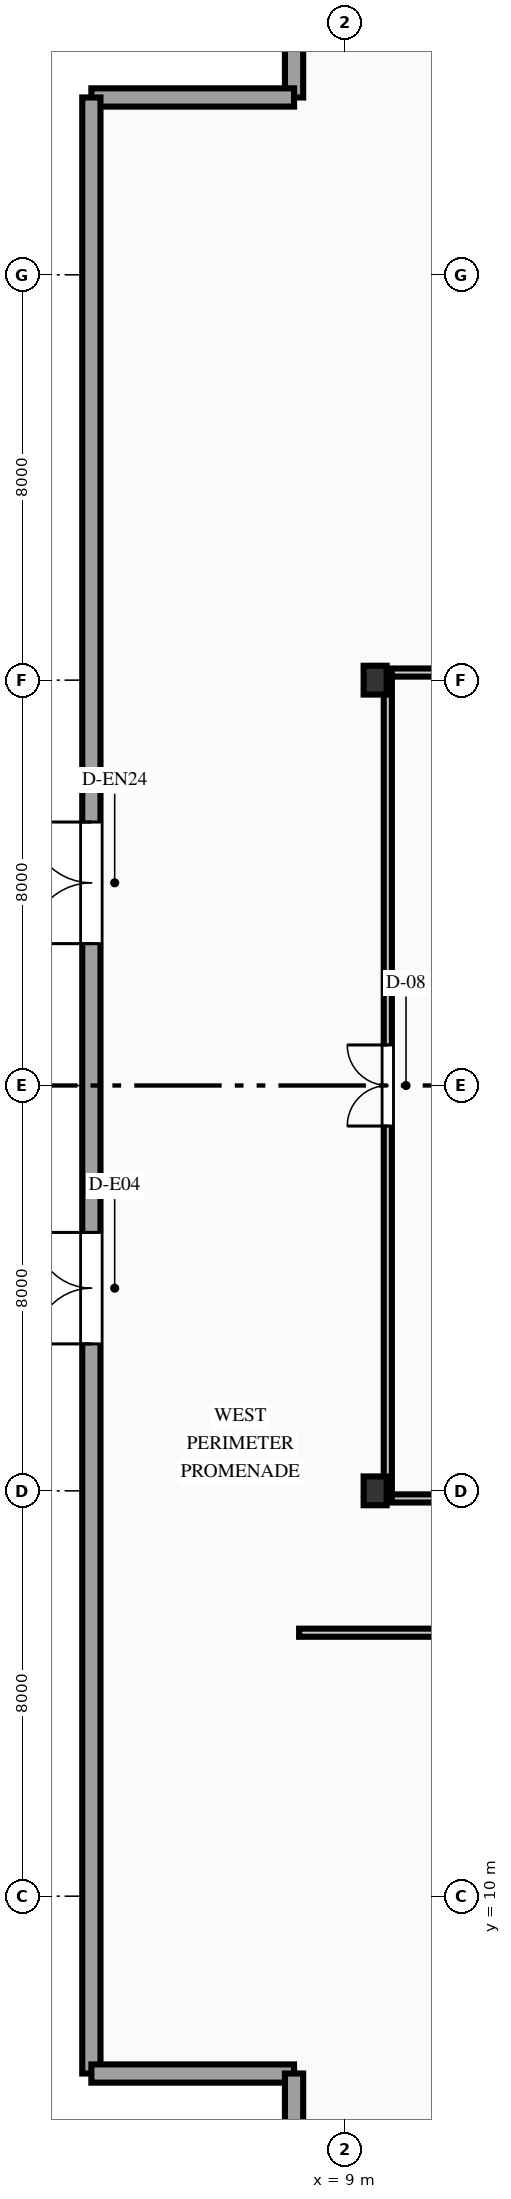
"""IFC4 building model, lengths in metres.
Left out: names, types, materials, properties, quantities, classifications, styles, units other than length and angle.
Written with IfcOpenShell. Run it as: python <this file> out.ifc"""

import sys

from ifc_helpers import new_model, si_unit, direction, frame, frame_2d, origin, origin_2d, place, context, subcontext, project, spatial, rectangle, i_section, extrude, element, fill, save


model = new_model("IFC4")
c1 = context("Model", 3, precision=1e-05, world=origin(), true_north=direction((0.0, 1.0)))
c2 = subcontext(c1, "Body", "Model", "MODEL_VIEW")
j1 = project(units=[si_unit("LENGTHUNIT", "METRE"), si_unit("PLANEANGLEUNIT", "RADIAN")], contexts=[c1])
p1 = place(None, origin())
s1 = spatial("IfcSite", under=j1, at=p1, CompositionType="ELEMENT")
p2 = place(p1, origin())
s2 = spatial("IfcBuilding", under=s1, at=p2, CompositionType="ELEMENT")
p3 = place(p2, origin())
s3 = spatial("IfcBuildingStorey", under=s2, at=p3, CompositionType="ELEMENT", Elevation=0.0)
for number, where, z_axis, x_axis in (
    (1, (9.6, 18.0, 0.0), (0.0, 0.0, 1.0), (1.0, 0.0, 0.0)),
    (2, (9.6, 34.0, 0.0), (0.0, 0.0, 1.0), (1.0, 0.0, 0.0)),
):
    element("IfcColumn", number, at=place(p3, frame(where, z_axis=z_axis, x_axis=x_axis)), inside=s3, PredefinedType="COLUMN", context=c2, shape_type="SweptSolid", body=[
        extrude(i_section(OverallWidth=0.454, OverallDepth=0.569, WebThickness=0.078, FlangeThickness=0.125, at=origin_2d()), origin(), (0.0, 0.0, 1.0), 6.0),
    ])
for number, where, z_axis, x_axis in (
    (3, (8.0, 45.5, 0.0), (0.0, 0.0, 1.0), (0.0, 1.0, 0.0)),
    (4, (4.0, 45.5, 0.0), (0.0, 0.0, 1.0), (1.0, 0.0, 0.0)),
):
    element("IfcWall", number, at=place(p3, frame(where, z_axis=z_axis, x_axis=x_axis)), inside=s3, PredefinedType="STANDARD", context=c2, shape_type="SweptSolid", body=[
        extrude(rectangle(XDim=4.0, YDim=0.36, at=frame_2d((2.0, 0.0))), origin(), (0.0, 0.0, 1.0), 5.67),
    ])
p4 = place(p3, frame((4.0, 6.5, 0.0), z_axis=(0.0, 0.0, 1.0), x_axis=(0.0, 1.0, 0.0)))
e5 = element("IfcWall", 5, at=p4, inside=s3, PredefinedType="STANDARD", context=c2, shape_type="SweptSolid", body=[
    extrude(rectangle(XDim=39.0, YDim=0.36, at=frame_2d((19.5, 0.0))), origin(), (0.0, 0.0, 1.0), 5.67),
])
p5 = place(p4, frame((14.4, 0.0, 0.0)))
e6 = element("IfcOpeningElement", 6, at=p5, cuts=e5, PredefinedType="OPENING", context=c2, shape_type="SweptSolid", body=[
    extrude(rectangle(XDim=2.2, YDim=2.4, at=frame_2d((1.1, 1.2))), frame((0.0, 0.19, 0.0), z_axis=(0.0, -1.0, 0.0), x_axis=(1.0, 0.0, 0.0)), (0.0, 0.0, 1.0), 0.38),
])
p6 = place(p4, frame((22.3, 0.0, 0.0)))
e7 = element("IfcOpeningElement", 7, at=p6, cuts=e5, PredefinedType="OPENING", context=c2, shape_type="SweptSolid", body=[
    extrude(rectangle(XDim=2.4, YDim=2.6, at=frame_2d((1.2, 1.3))), frame((0.0, 0.19, 0.0), z_axis=(0.0, -1.0, 0.0), x_axis=(1.0, 0.0, 0.0)), (0.0, 0.0, 1.0), 0.38),
])
for number, where, z_axis, x_axis in (
    (8, (8.0, 6.5, 0.0), (0.0, 0.0, 1.0), (-1.0, 0.0, 0.0)),
    (9, (8.0, 2.5, 0.0), (0.0, 0.0, 1.0), (0.0, 1.0, 0.0)),
):
    element("IfcWall", number, at=place(p3, frame(where, z_axis=z_axis, x_axis=x_axis)), inside=s3, PredefinedType="STANDARD", context=c2, shape_type="SweptSolid", body=[
        extrude(rectangle(XDim=4.0, YDim=0.36, at=frame_2d((2.0, 0.0))), origin(), (0.0, 0.0, 1.0), 5.67),
    ])
p7 = place(p3, frame((9.85, 17.85, 0.0), z_axis=(0.0, 0.0, 1.0), x_axis=(1.0, 0.0, 0.0)))
e10 = element("IfcWall", 10, at=p7, inside=s3, PredefinedType="PARTITIONING", context=c2, shape_type="SweptSolid", body=[
    extrude(rectangle(XDim=12.35, YDim=0.16, at=frame_2d((6.175, 0.0))), origin(), (0.0, 0.0, 1.0), 4.803),
])
p8 = place(p7, frame((9.875, 0.0, 0.0)))
e11 = element("IfcOpeningElement", 11, at=p8, cuts=e10, PredefinedType="OPENING", context=c2, shape_type="SweptSolid", body=[
    extrude(rectangle(XDim=1.05, YDim=2.15, at=frame_2d((0.525, 1.075))), frame((0.0, 0.09, 0.0), z_axis=(0.0, -1.0, 0.0), x_axis=(1.0, 0.0, 0.0)), (0.0, 0.0, 1.0), 0.18),
])
p9 = place(p3, frame((9.85, 34.15, 0.0), z_axis=(0.0, 0.0, 1.0), x_axis=(1.0, 0.0, 0.0)))
e12 = element("IfcWall", 12, at=p9, inside=s3, PredefinedType="PARTITIONING", context=c2, shape_type="SweptSolid", body=[
    extrude(rectangle(XDim=8.45, YDim=0.16, at=frame_2d((4.225, 0.0))), origin(), (0.0, 0.0, 1.0), 4.803),
])
p10 = place(p3, frame((9.85, 17.85, 0.0), z_axis=(0.0, 0.0, 1.0), x_axis=(0.0, 1.0, 0.0)))
e13 = element("IfcWall", 13, at=p10, inside=s3, PredefinedType="PARTITIONING", context=c2, shape_type="SweptSolid", body=[
    extrude(rectangle(XDim=16.3, YDim=0.16, at=frame_2d((8.15, 0.0))), origin(), (0.0, 0.0, 1.0), 4.803),
])
p11 = place(p10, frame((7.35, 0.0, 0.0)))
e14 = element("IfcOpeningElement", 14, at=p11, cuts=e13, PredefinedType="OPENING", context=c2, shape_type="SweptSolid", body=[
    extrude(rectangle(XDim=1.6, YDim=2.2, at=frame_2d((0.8, 1.1))), frame((0.0, 0.09, 0.0), z_axis=(0.0, -1.0, 0.0), x_axis=(1.0, 0.0, 0.0)), (0.0, 0.0, 1.0), 0.18),
])
p12 = place(p3, frame((8.1, 15.2, 0.0), z_axis=(0.0, 0.0, 1.0), x_axis=(1.0, 0.0, 0.0)))
e15 = element("IfcWall", 15, at=p12, inside=s3, PredefinedType="PARTITIONING", context=c2, shape_type="SweptSolid", body=[
    extrude(rectangle(XDim=22.3, YDim=0.16, at=frame_2d((11.15, 0.0))), origin(), (0.0, 0.0, 1.0), 4.803),
])
p13 = place(p12, frame((16.6, 0.0, 0.0)))
e16 = element("IfcOpeningElement", 16, at=p13, cuts=e15, PredefinedType="OPENING", context=c2, shape_type="SweptSolid", body=[
    extrude(rectangle(XDim=1.6, YDim=2.2, at=frame_2d((0.8, 1.1))), frame((0.0, 0.09, 0.0), z_axis=(0.0, -1.0, 0.0), x_axis=(1.0, 0.0, 0.0)), (0.0, 0.0, 1.0), 0.18),
])
p14 = place(p5, origin())
e17 = element("IfcDoor", 17, at=p14, inside=s3, OperationType="DOUBLE_DOOR_SINGLE_SWING", PredefinedType="DOOR", context=c2, shape_type="SweptSolid", body=[
    extrude(rectangle(XDim=2.2, YDim=2.4, at=frame_2d((1.1, 1.2))), frame((0.0, 0.025, 0.0), z_axis=(0.0, -1.0, 0.0), x_axis=(1.0, 0.0, 0.0)), (0.0, 0.0, 1.0), 0.05),
])
fill(e6, e17)
p15 = place(p6, origin())
e18 = element("IfcDoor", 18, at=p15, inside=s3, OperationType="DOUBLE_DOOR_SINGLE_SWING", PredefinedType="DOOR", context=c2, shape_type="SweptSolid", body=[
    extrude(rectangle(XDim=2.4, YDim=2.6, at=frame_2d((1.2, 1.3))), frame((0.0, 0.025, 0.0), z_axis=(0.0, -1.0, 0.0), x_axis=(1.0, 0.0, 0.0)), (0.0, 0.0, 1.0), 0.05),
])
fill(e7, e18)
p16 = place(p11, origin())
e19 = element("IfcDoor", 19, at=p16, inside=s3, OperationType="DOUBLE_DOOR_SINGLE_SWING", PredefinedType="DOOR", context=c2, shape_type="SweptSolid", body=[
    extrude(rectangle(XDim=1.6, YDim=2.2, at=frame_2d((0.8, 1.1))), frame((0.0, 0.025, 0.0), z_axis=(0.0, -1.0, 0.0), x_axis=(1.0, 0.0, 0.0)), (0.0, 0.0, 1.0), 0.05),
])
fill(e14, e19)
save(model, sys.argv[1])
